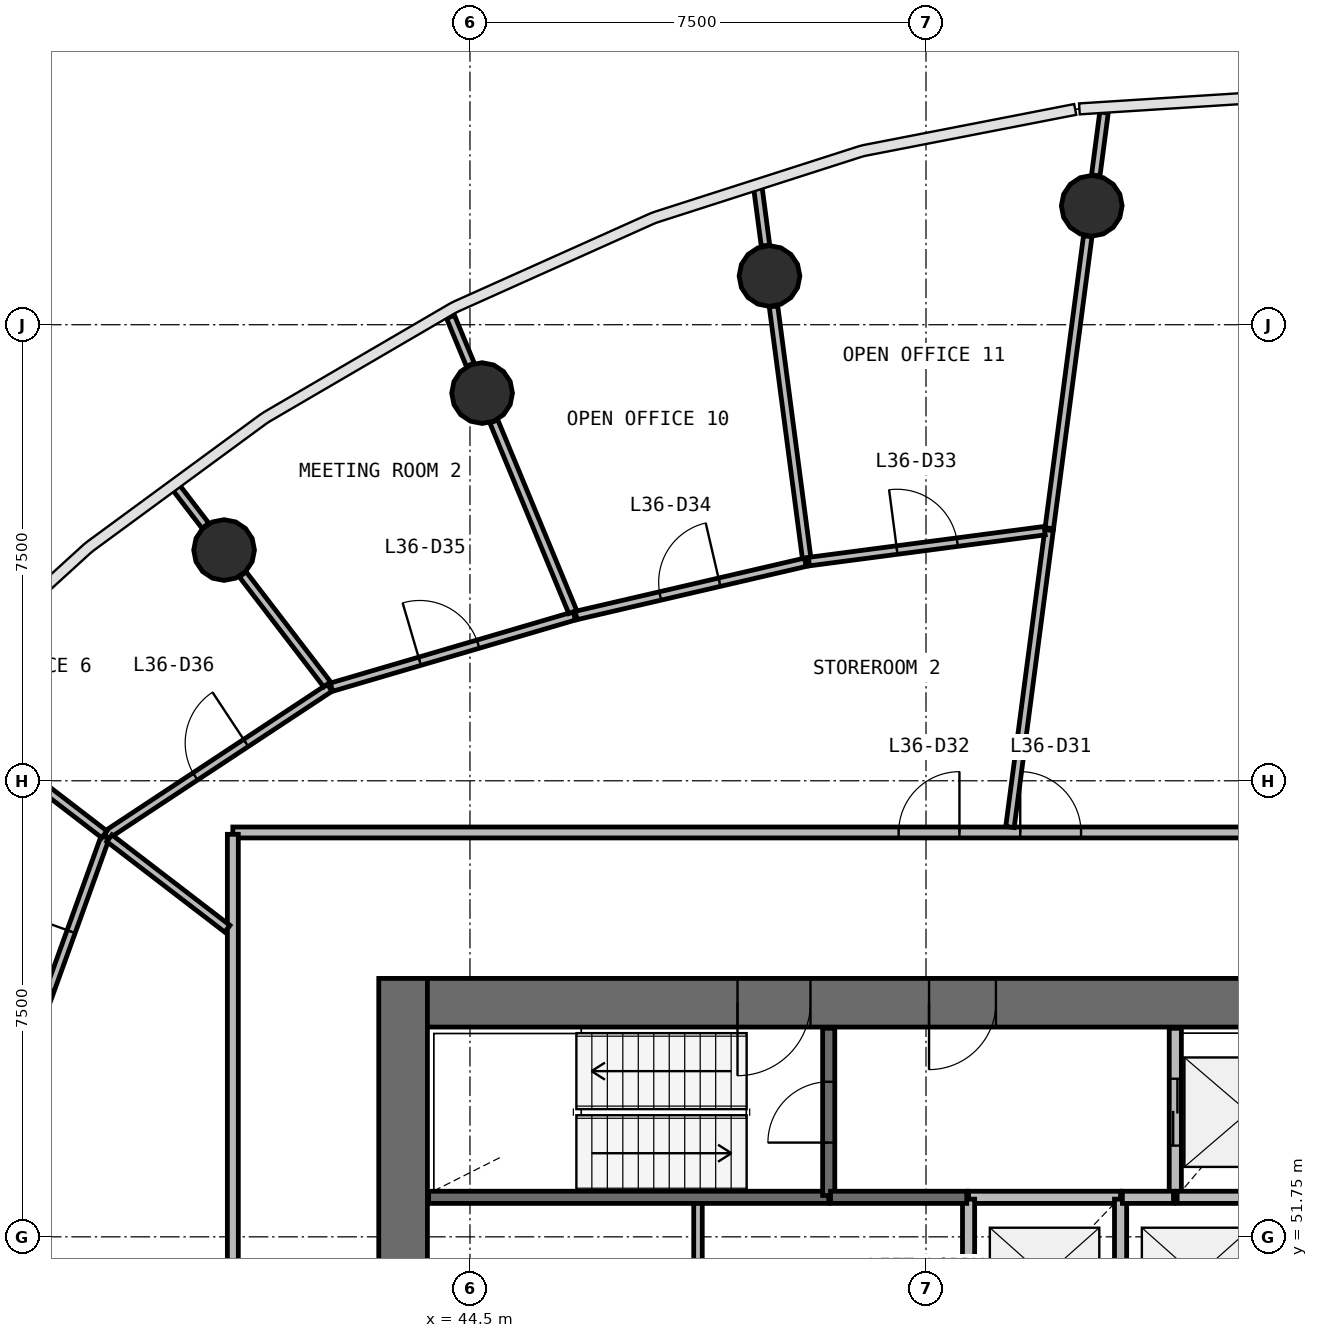
"""IFC4 building model, lengths in metres.
Left out: names, types, materials, properties, quantities, classifications, styles, units other than length and angle.
Written with IfcOpenShell. Run it as: python <this file> out.ifc"""

import sys

from ifc_helpers import new_model, si_unit, direction, frame, frame_2d, origin, origin_2d, place, context, subcontext, project, spatial, rectangle, circle, extrude, source, transform, mapped, element, fill, save


model = new_model("IFC4")
c1 = context("Model", 3, precision=1e-05, world=origin(), true_north=direction((0.0, 1.0)))
c2 = subcontext(c1, "Body", "Model", "MODEL_VIEW")
j1 = project(units=[si_unit("LENGTHUNIT", "METRE"), si_unit("PLANEANGLEUNIT", "RADIAN")], contexts=[c1])
p1 = place(None, origin())
s1 = spatial("IfcSite", under=j1, at=p1, CompositionType="ELEMENT")
p2 = place(p1, origin())
s2 = spatial("IfcBuilding", under=s1, at=p2, CompositionType="ELEMENT")
p3 = place(p2, frame((0.0, 0.0, 152.6)))
s3 = spatial("IfcBuildingStorey", under=s2, at=p3, CompositionType="ELEMENT", Elevation=152.6)
p4 = place(p3, frame((43.4, 56.0, 0.0), z_axis=(0.0, 0.0, 1.0), x_axis=(0.0, -1.0, 0.0)))
e1 = element("IfcWall", 1, at=p4, inside=s3, PredefinedType="SHEAR", context=c2, shape_type="SweptSolid", body=[
    extrude(rectangle(XDim=16.0, YDim=0.8, at=frame_2d((8.0, 0.0))), origin(), (0.0, 0.0, 1.0), 3.9),
])
p5 = place(p4, frame((7.1, 0.0, 0.0)))
e2 = element("IfcOpeningElement", 2, at=p5, cuts=e1, PredefinedType="OPENING", context=c2, shape_type="SweptSolid", body=[
    extrude(rectangle(XDim=1.8, YDim=2.1, at=frame_2d((0.9, 1.05))), frame((0.0, 0.41, 0.0), z_axis=(0.0, -1.0, 0.0), x_axis=(1.0, 0.0, 0.0)), (0.0, 0.0, 1.0), 0.82),
])
p6 = place(p3, frame((60.2, 55.6, 0.0), z_axis=(0.0, 0.0, 1.0), x_axis=(-1.0, 0.0, 0.0)))
e3 = element("IfcWall", 3, at=p6, inside=s3, PredefinedType="SHEAR", context=c2, shape_type="SweptSolid", body=[
    extrude(rectangle(XDim=16.4, YDim=0.8, at=frame_2d((8.2, 0.0))), origin(), (0.0, 0.0, 1.0), 3.9),
])
p7 = place(p6, frame((0.2, 0.0, 0.0)))
e4 = element("IfcOpeningElement", 4, at=p7, cuts=e3, PredefinedType="OPENING", context=c2, shape_type="SweptSolid", body=[
    extrude(rectangle(XDim=1.1, YDim=2.1, at=frame_2d((0.55, 1.05))), frame((0.0, 0.41, 0.0), z_axis=(0.0, -1.0, 0.0), x_axis=(1.0, 0.0, 0.0)), (0.0, 0.0, 1.0), 0.82),
])
p8 = place(p6, frame((10.1, 0.0, 0.0)))
e5 = element("IfcOpeningElement", 5, at=p8, cuts=e3, PredefinedType="OPENING", context=c2, shape_type="SweptSolid", body=[
    extrude(rectangle(XDim=1.2, YDim=2.1, at=frame_2d((0.6, 1.05))), frame((0.0, 0.41, 0.0), z_axis=(0.0, -1.0, 0.0), x_axis=(1.0, 0.0, 0.0)), (0.0, 0.0, 1.0), 0.82),
])
p9 = place(p6, frame((7.05, 0.0, 0.0)))
e6 = element("IfcOpeningElement", 6, at=p9, cuts=e3, PredefinedType="OPENING", context=c2, shape_type="SweptSolid", body=[
    extrude(rectangle(XDim=1.1, YDim=2.1, at=frame_2d((0.55, 1.05))), frame((0.0, 0.41, 0.0), z_axis=(0.0, -1.0, 0.0), x_axis=(1.0, 0.0, 0.0)), (0.0, 0.0, 1.0), 0.82),
])
m1 = source(origin(), c2, "Body", "SweptSolid", [
    extrude(circle(Radius=0.5, at=origin_2d()), origin(), (0.0, 0.0, 1.0), 3.9),
])
for number, where, z_axis, x_axis in (
    (7, (54.726, 68.705, 0.0), (0.0, 0.0, 1.0), (1.0, 0.0, 0.0)),
    (8, (49.426, 67.551, 0.0), (0.0, 0.0, 1.0), (1.0, 0.0, 0.0)),
    (9, (44.699, 65.626, 0.0), (0.0, 0.0, 1.0), (1.0, 0.0, 0.0)),
    (10, (40.456, 63.044, 0.0), (0.0, 0.0, 1.0), (1.0, 0.0, 0.0)),
):
    element("IfcColumn", number, at=place(p3, frame(where, z_axis=z_axis, x_axis=x_axis)), inside=s3, PredefinedType="COLUMN", context=c2, shape_type="MappedRepresentation", body=[
        mapped(m1, transform((0.0, 0.0, 0.0), scale=1.0)),
    ])
p10 = place(p3, frame((43.82, 52.4, 0.0), z_axis=(0.0, 0.0, 1.0), x_axis=(1.0, 0.0, 0.0)))
e11 = element("IfcWall", 11, at=p10, inside=s3, PredefinedType="SOLIDWALL", context=c2, shape_type="SweptSolid", body=[
    extrude(rectangle(XDim=6.58, YDim=0.2, at=frame_2d((3.29, 0.0))), origin(), (0.0, 0.0, 1.0), 3.58),
])
p11 = place(p3, frame((50.4, 52.43, 0.0), z_axis=(0.0, 0.0, 1.0), x_axis=(0.0, 1.0, 0.0)))
e12 = element("IfcWall", 12, at=p11, inside=s3, PredefinedType="SOLIDWALL", context=c2, shape_type="SweptSolid", body=[
    extrude(rectangle(XDim=2.75, YDim=0.2, at=frame_2d((1.375, 0.0))), origin(), (0.0, 0.0, 1.0), 3.58),
])
p12 = place(p11, frame((0.87, 0.0, 0.0)))
e13 = element("IfcOpeningElement", 13, at=p12, cuts=e12, PredefinedType="OPENING", context=c2, shape_type="SweptSolid", body=[
    extrude(rectangle(XDim=1.0, YDim=2.1, at=frame_2d((0.5, 1.05))), frame((0.0, 0.11, 0.0), z_axis=(0.0, -1.0, 0.0), x_axis=(1.0, 0.0, 0.0)), (0.0, 0.0, 1.0), 0.22),
])
p13 = place(p3, frame((56.1, 55.18, 0.0), z_axis=(0.0, 0.0, 1.0), x_axis=(0.0, -1.0, 0.0)))
e14 = element("IfcWall", 14, at=p13, inside=s3, PredefinedType="SOLIDWALL", context=c2, shape_type="SweptSolid", body=[
    extrude(rectangle(XDim=2.78, YDim=0.2, at=frame_2d((1.39, 0.0))), origin(), (0.0, 0.0, 1.0), 3.58),
])
p14 = place(p13, frame((0.83, 0.0, 0.0)))
e15 = element("IfcOpeningElement", 15, at=p14, cuts=e14, PredefinedType="OPENING", context=c2, shape_type="SweptSolid", body=[
    extrude(rectangle(XDim=1.1, YDim=2.1, at=frame_2d((0.55, 1.05))), frame((0.0, 0.11, 0.0), z_axis=(0.0, -1.0, 0.0), x_axis=(1.0, 0.0, 0.0)), (0.0, 0.0, 1.0), 0.22),
])
p15 = place(p3, frame((55.2, 52.4, 0.0), z_axis=(0.0, 0.0, 1.0), x_axis=(-1.0, 0.0, 0.0)))
e16 = element("IfcWall", 16, at=p15, inside=s3, PredefinedType="SOLIDWALL", context=c2, shape_type="SweptSolid", body=[
    extrude(rectangle(XDim=2.5, YDim=0.2, at=frame_2d((1.25, 0.0))), origin(), (0.0, 0.0, 1.0), 3.58),
])
for number, where, z_axis, x_axis in (
    (17, (52.7, 52.37, 0.0), (0.0, 0.0, 1.0), (0.0, -1.0, 0.0)),
    (18, (55.2, 50.01, 0.0), (0.0, 0.0, 1.0), (0.0, 1.0, 0.0)),
):
    element("IfcWall", number, at=place(p3, frame(where, z_axis=z_axis, x_axis=x_axis)), inside=s3, PredefinedType="SOLIDWALL", context=c2, shape_type="SweptSolid", body=[
        extrude(rectangle(XDim=2.36, YDim=0.2, at=frame_2d((1.18, 0.0))), origin(), (0.0, 0.0, 1.0), 3.58),
    ])
p16 = place(p3, frame((50.43, 52.4, 0.0), z_axis=(0.0, 0.0, 1.0), x_axis=(1.0, 0.0, 0.0)))
e19 = element("IfcWall", 19, at=p16, inside=s3, PredefinedType="SOLIDWALL", context=c2, shape_type="SweptSolid", body=[
    extrude(rectangle(XDim=2.24, YDim=0.2, at=frame_2d((1.12, 0.0))), origin(), (0.0, 0.0, 1.0), 3.58),
])
p17 = place(p3, frame((57.67, 52.4, 0.0), z_axis=(0.0, 0.0, 1.0), x_axis=(-1.0, 0.0, 0.0)))
e20 = element("IfcWall", 20, at=p17, inside=s3, PredefinedType="SOLIDWALL", context=c2, shape_type="SweptSolid", body=[
    extrude(rectangle(XDim=1.54, YDim=0.2, at=frame_2d((0.77, 0.0))), origin(), (0.0, 0.0, 1.0), 3.58),
])
p18 = place(p3, frame((56.07, 52.4, 0.0), z_axis=(0.0, 0.0, 1.0), x_axis=(-1.0, 0.0, 0.0)))
e21 = element("IfcWall", 21, at=p18, inside=s3, PredefinedType="SOLIDWALL", context=c2, shape_type="SweptSolid", body=[
    extrude(rectangle(XDim=0.84, YDim=0.2, at=frame_2d((0.42, 0.0))), origin(), (0.0, 0.0, 1.0), 3.58),
])
p19 = place(p3, frame((40.6, 58.4, 0.0), z_axis=(0.0, 0.0, 1.0), x_axis=(1.0, 0.0, 0.0)))
e22 = element("IfcWall", 22, at=p19, inside=s3, PredefinedType="PARTITIONING", context=c2, shape_type="SweptSolid", body=[
    extrude(rectangle(XDim=22.8, YDim=0.18, at=frame_2d((11.4, 0.0))), origin(), (0.0, 0.0, 1.0), 2.88),
])
p20 = place(p19, frame((12.95, 0.0, 0.0)))
e23 = element("IfcOpeningElement", 23, at=p20, cuts=e22, PredefinedType="OPENING", context=c2, shape_type="SweptSolid", body=[
    extrude(rectangle(XDim=1.0, YDim=2.1, at=frame_2d((0.5, 1.05))), frame((0.0, 0.1, 0.0), z_axis=(0.0, -1.0, 0.0), x_axis=(1.0, 0.0, 0.0)), (0.0, 0.0, 1.0), 0.2),
])
p21 = place(p19, frame((10.95, 0.0, 0.0)))
e24 = element("IfcOpeningElement", 24, at=p21, cuts=e22, PredefinedType="OPENING", context=c2, shape_type="SweptSolid", body=[
    extrude(rectangle(XDim=1.0, YDim=2.1, at=frame_2d((0.5, 1.05))), frame((0.0, 0.1, 0.0), z_axis=(0.0, -1.0, 0.0), x_axis=(1.0, 0.0, 0.0)), (0.0, 0.0, 1.0), 0.2),
])
p22 = place(p3, frame((40.6, 37.63, 0.0), z_axis=(0.0, 0.0, 1.0), x_axis=(0.0, 1.0, 0.0)))
e25 = element("IfcWall", 25, at=p22, inside=s3, PredefinedType="PARTITIONING", context=c2, shape_type="SweptSolid", body=[
    extrude(rectangle(XDim=20.74, YDim=0.18, at=frame_2d((10.37, 0.0))), origin(), (0.0, 0.0, 1.0), 2.88),
])
p23 = place(p22, frame((9.89, 0.0, 0.0)))
e26 = element("IfcOpeningElement", 26, at=p23, cuts=e25, PredefinedType="OPENING", context=c2, shape_type="SweptSolid", body=[
    extrude(rectangle(XDim=1.0, YDim=2.1, at=frame_2d((0.5, 1.05))), frame((0.0, 0.1, 0.0), z_axis=(0.0, -1.0, 0.0), x_axis=(1.0, 0.0, 0.0)), (0.0, 0.0, 1.0), 0.2),
])
p24 = place(p22, frame((4.29, 0.0, 0.0)))
e27 = element("IfcOpeningElement", 27, at=p24, cuts=e25, PredefinedType="OPENING", context=c2, shape_type="SweptSolid", body=[
    extrude(rectangle(XDim=1.0, YDim=2.1, at=frame_2d((0.5, 1.05))), frame((0.0, 0.1, 0.0), z_axis=(0.0, -1.0, 0.0), x_axis=(1.0, 0.0, 0.0)), (0.0, 0.0, 1.0), 0.2),
])
p25 = place(p3, frame((53.381, 58.49, 0.0), z_axis=(0.0, 0.0, 1.0), x_axis=(0.130523758186, 0.991445181817, 0.0)))
e28 = element("IfcWall", 28, at=p25, inside=s3, PredefinedType="PARTITIONING", context=c2, shape_type="SweptSolid", body=[
    extrude(rectangle(XDim=4.925, YDim=0.14, at=frame_2d((2.462, 0.0))), origin(), (0.0, 0.0, 1.0), 2.88),
])
p26 = place(p3, frame((54.028, 63.402, 0.0), z_axis=(0.0, 0.0, 1.0), x_axis=(0.130532734851, 0.991443999998, 0.0)))
e29 = element("IfcWall", 29, at=p26, inside=s3, PredefinedType="PARTITIONING", context=c2, shape_type="SweptSolid", body=[
    extrude(rectangle(XDim=4.844, YDim=0.14, at=frame_2d((2.422, 0.0))), origin(), (0.0, 0.0, 1.0), 2.88),
])
p27 = place(p3, frame((38.511, 58.351, 0.0), z_axis=(0.0, 0.0, 1.0), x_axis=(0.834612459485, 0.550837582662, 0.0)))
e30 = element("IfcWall", 30, at=p27, inside=s3, PredefinedType="PARTITIONING", context=c2, shape_type="SweptSolid", body=[
    extrude(rectangle(XDim=4.412, YDim=0.14, at=frame_2d((2.206, 0.0))), origin(), (0.0, 0.0, 1.0), 2.88),
])
p28 = place(p27, frame((1.762, 0.0, 0.0)))
e31 = element("IfcOpeningElement", 31, at=p28, cuts=e30, PredefinedType="OPENING", context=c2, shape_type="SweptSolid", body=[
    extrude(rectangle(XDim=1.0, YDim=2.1, at=frame_2d((0.5, 1.05))), frame((0.0, 0.08, 0.0), z_axis=(0.0, -1.0, 0.0), x_axis=(1.0, 0.0, 0.0)), (0.0, 0.0, 1.0), 0.16),
])
p29 = place(p3, frame((37.016, 54.207, 0.0), z_axis=(0.0, 0.0, 1.0), x_axis=(0.339349662801, 0.940660303381, 0.0)))
e32 = element("IfcWall", 32, at=p29, inside=s3, PredefinedType="PARTITIONING", context=c2, shape_type="SweptSolid", body=[
    extrude(rectangle(XDim=4.376, YDim=0.14, at=frame_2d((2.188, 0.0))), origin(), (0.0, 0.0, 1.0), 2.88),
])
p30 = place(p29, frame((1.725, 0.0, 0.0)))
e33 = element("IfcOpeningElement", 33, at=p30, cuts=e32, PredefinedType="OPENING", context=c2, shape_type="SweptSolid", body=[
    extrude(rectangle(XDim=1.0, YDim=2.1, at=frame_2d((0.5, 1.05))), frame((0.0, 0.08, 0.0), z_axis=(0.0, -1.0, 0.0), x_axis=(1.0, 0.0, 0.0)), (0.0, 0.0, 1.0), 0.16),
])
p31 = place(p3, frame((50.045, 62.85, 0.0), z_axis=(0.0, 0.0, 1.0), x_axis=(-0.130506679213, 0.991447430115, 0.0)))
e34 = element("IfcWall", 34, at=p31, inside=s3, PredefinedType="PARTITIONING", context=c2, shape_type="SweptSolid", body=[
    extrude(rectangle(XDim=4.237, YDim=0.14, at=frame_2d((2.119, 0.0))), origin(), (0.0, 0.0, 1.0), 2.88),
])
p32 = place(p3, frame((42.222, 60.789, 0.0), z_axis=(0.0, 0.0, 1.0), x_axis=(0.959559478974, 0.281505961415, 0.0)))
e35 = element("IfcWall", 35, at=p32, inside=s3, PredefinedType="PARTITIONING", context=c2, shape_type="SweptSolid", body=[
    extrude(rectangle(XDim=4.164, YDim=0.14, at=frame_2d((2.082, 0.0))), origin(), (0.0, 0.0, 1.0), 2.88),
])
p33 = place(p32, frame((1.514, 0.0, 0.0)))
e36 = element("IfcOpeningElement", 36, at=p33, cuts=e35, PredefinedType="OPENING", context=c2, shape_type="SweptSolid", body=[
    extrude(rectangle(XDim=1.0, YDim=2.1, at=frame_2d((0.5, 1.05))), frame((0.0, 0.08, 0.0), z_axis=(0.0, -1.0, 0.0), x_axis=(1.0, 0.0, 0.0)), (0.0, 0.0, 1.0), 0.16),
])
p34 = place(p3, frame((50.075, 62.854, 0.0), z_axis=(0.0, 0.0, 1.0), x_axis=(0.991491442794, 0.130171882012, 0.0)))
e37 = element("IfcWall", 37, at=p34, inside=s3, PredefinedType="PARTITIONING", context=c2, shape_type="SweptSolid", body=[
    extrude(rectangle(XDim=3.91, YDim=0.14, at=frame_2d((1.955, 0.0))), origin(), (0.0, 0.0, 1.0), 2.88),
])
p35 = place(p34, frame((1.461, 0.0, 0.0)))
e38 = element("IfcOpeningElement", 38, at=p35, cuts=e37, PredefinedType="OPENING", context=c2, shape_type="SweptSolid", body=[
    extrude(rectangle(XDim=1.0, YDim=2.1, at=frame_2d((0.5, 1.05))), frame((0.0, 0.08, 0.0), z_axis=(0.0, -1.0, 0.0), x_axis=(1.0, 0.0, 0.0)), (0.0, 0.0, 1.0), 0.16),
])
p36 = place(p3, frame((46.246, 61.968, 0.0), z_axis=(0.0, 0.0, 1.0), x_axis=(0.974087273118, 0.226172465941, 0.0)))
e39 = element("IfcWall", 39, at=p36, inside=s3, PredefinedType="PARTITIONING", context=c2, shape_type="SweptSolid", body=[
    extrude(rectangle(XDim=3.87, YDim=0.14, at=frame_2d((1.935, 0.0))), origin(), (0.0, 0.0, 1.0), 2.88),
])
p37 = place(p36, frame((1.42, 0.0, 0.0)))
e40 = element("IfcOpeningElement", 40, at=p37, cuts=e39, PredefinedType="OPENING", context=c2, shape_type="SweptSolid", body=[
    extrude(rectangle(XDim=1.0, YDim=2.1, at=frame_2d((0.5, 1.05))), frame((0.0, 0.08, 0.0), z_axis=(0.0, -1.0, 0.0), x_axis=(1.0, 0.0, 0.0)), (0.0, 0.0, 1.0), 0.16),
])
p38 = place(p3, frame((46.19, 62.027, 0.0), z_axis=(0.0, 0.0, 1.0), x_axis=(-0.382697308523, 0.923873784696, 0.0)))
e41 = element("IfcWall", 41, at=p38, inside=s3, PredefinedType="PARTITIONING", context=c2, shape_type="SweptSolid", body=[
    extrude(rectangle(XDim=3.391, YDim=0.14, at=frame_2d((1.695, 0.0))), origin(), (0.0, 0.0, 1.0), 2.88),
])
p39 = place(p3, frame((40.51, 56.817, 0.0), z_axis=(0.0, 0.0, 1.0), x_axis=(-0.793387804713, 0.608716511467, 0.0)))
e42 = element("IfcWall", 42, at=p39, inside=s3, PredefinedType="PARTITIONING", context=c2, shape_type="SweptSolid", body=[
    extrude(rectangle(XDim=2.446, YDim=0.14, at=frame_2d((1.223, 0.0))), origin(), (0.0, 0.0, 1.0), 2.88),
])
p40 = place(p3, frame((48.25, 50.01, 0.0), z_axis=(0.0, 0.0, 1.0), x_axis=(0.0, 1.0, 0.0)))
e43 = element("IfcWall", 43, at=p40, inside=s3, PredefinedType="PARTITIONING", context=c2, shape_type="SweptSolid", body=[
    extrude(rectangle(XDim=2.29, YDim=0.14, at=frame_2d((1.145, 0.0))), origin(), (0.0, 0.0, 1.0), 2.88),
])
p41 = place(p3, frame((42.15, 60.836, 0.0), z_axis=(0.0, 0.0, 1.0), x_axis=(-0.608757629388, 0.793356255828, 0.0)))
e44 = element("IfcWall", 44, at=p41, inside=s3, PredefinedType="PARTITIONING", context=c2, shape_type="SweptSolid", body=[
    extrude(rectangle(XDim=2.279, YDim=0.14, at=frame_2d((1.139, 0.0))), origin(), (0.0, 0.0, 1.0), 2.88),
])
p42 = place(p3, frame((38.487, 58.369, 0.0), z_axis=(0.0, 0.0, 1.0), x_axis=(-0.793336842099, 0.608782929269, 0.0)))
e45 = element("IfcWall", 45, at=p42, inside=s3, PredefinedType="PARTITIONING", context=c2, shape_type="SweptSolid", body=[
    extrude(rectangle(XDim=1.794, YDim=0.14, at=frame_2d((0.897, 0.0))), origin(), (0.0, 0.0, 1.0), 2.88),
])
p43 = place(p3, frame((54.792, 69.205, 0.0), z_axis=(0.0, 0.0, 1.0), x_axis=(0.130569518357, 0.991439156417, 0.0)))
e46 = element("IfcWall", 46, at=p43, inside=s3, PredefinedType="PARTITIONING", context=c2, shape_type="SweptSolid", body=[
    extrude(rectangle(XDim=1.043, YDim=0.14, at=frame_2d((0.522, 0.0))), origin(), (0.0, 0.0, 1.0), 2.88),
])
p44 = place(p3, frame((49.36, 68.052, 0.0), z_axis=(0.0, 0.0, 1.0), x_axis=(-0.130434626054, 0.991456911987, 0.0)))
e47 = element("IfcWall", 47, at=p44, inside=s3, PredefinedType="PARTITIONING", context=c2, shape_type="SweptSolid", body=[
    extrude(rectangle(XDim=0.953, YDim=0.14, at=frame_2d((0.476, 0.0))), origin(), (0.0, 0.0, 1.0), 2.88),
])
p45 = place(p3, frame((44.506, 66.092, 0.0), z_axis=(0.0, 0.0, 1.0), x_axis=(-0.382722863119, 0.923863198772, 0.0)))
e48 = element("IfcWall", 48, at=p45, inside=s3, PredefinedType="PARTITIONING", context=c2, shape_type="SweptSolid", body=[
    extrude(rectangle(XDim=0.852, YDim=0.14, at=frame_2d((0.426, 0.0))), origin(), (0.0, 0.0, 1.0), 2.88),
])
p46 = place(p3, frame((40.149, 63.445, 0.0), z_axis=(0.0, 0.0, 1.0), x_axis=(-0.608659697441, 0.793431391307, 0.0)))
e49 = element("IfcWall", 49, at=p46, inside=s3, PredefinedType="PARTITIONING", context=c2, shape_type="SweptSolid", body=[
    extrude(rectangle(XDim=0.786, YDim=0.14, at=frame_2d((0.393, 0.0))), origin(), (0.0, 0.0, 1.0), 2.88),
])
m2 = source(origin(), c2, "Body", "SweptSolid", [
    extrude(rectangle(XDim=1.1, YDim=2.1, at=frame_2d((0.55, 1.05))), frame((0.0, 0.025, 0.0), z_axis=(0.0, -1.0, 0.0), x_axis=(1.0, 0.0, 0.0)), (0.0, 0.0, 1.0), 0.05),
])
p47 = place(p14, origin())
e50 = element("IfcDoor", 50, at=p47, inside=s3, OperationType="DOUBLE_DOOR_SLIDING", PredefinedType="USERDEFINED", context=c2, shape_type="MappedRepresentation", body=[
    mapped(m2, transform((0.0, 0.0, 0.0), scale=1.0)),
])
fill(e15, e50)
m3 = source(origin(), c2, "Body", "SweptSolid", [
    extrude(rectangle(XDim=1.2, YDim=2.1, at=frame_2d((0.6, 1.05))), frame((0.0, 0.025, 0.0), z_axis=(0.0, -1.0, 0.0), x_axis=(1.0, 0.0, 0.0)), (0.0, 0.0, 1.0), 0.05),
])
p48 = place(p8, origin())
e51 = element("IfcDoor", 51, at=p48, inside=s3, OperationType="SINGLE_SWING_RIGHT", PredefinedType="DOOR", context=c2, shape_type="MappedRepresentation", body=[
    mapped(m3, transform((0.0, 0.0, 0.0), scale=1.0)),
])
fill(e5, e51)
m4 = source(origin(), c2, "Body", "SweptSolid", [
    extrude(rectangle(XDim=1.0, YDim=2.1, at=frame_2d((0.5, 1.05))), frame((0.0, 0.025, 0.0), z_axis=(0.0, -1.0, 0.0), x_axis=(1.0, 0.0, 0.0)), (0.0, 0.0, 1.0), 0.05),
])
p49 = place(p12, origin())
e52 = element("IfcDoor", 52, at=p49, inside=s3, OperationType="SINGLE_SWING_LEFT", PredefinedType="DOOR", context=c2, shape_type="MappedRepresentation", body=[
    mapped(m4, transform((0.0, 0.0, 0.0), scale=1.0)),
])
fill(e13, e52)
m5 = source(origin(), c2, "Body", "SweptSolid", [
    extrude(rectangle(XDim=1.1, YDim=2.1, at=frame_2d((0.55, 1.05))), frame((0.0, 0.025, 0.0), z_axis=(0.0, -1.0, 0.0), x_axis=(1.0, 0.0, 0.0)), (0.0, 0.0, 1.0), 0.05),
])
p50 = place(p9, origin())
e53 = element("IfcDoor", 53, at=p50, inside=s3, OperationType="SINGLE_SWING_RIGHT", PredefinedType="DOOR", context=c2, shape_type="MappedRepresentation", body=[
    mapped(m5, transform((0.0, 0.0, 0.0), scale=1.0)),
])
fill(e6, e53)
m6 = source(origin(), c2, "Body", "SweptSolid", [
    extrude(rectangle(XDim=1.0, YDim=2.1, at=frame_2d((0.5, 1.05))), frame((0.0, 0.025, 0.0), z_axis=(0.0, -1.0, 0.0), x_axis=(1.0, 0.0, 0.0)), (0.0, 0.0, 1.0), 0.05),
])
p51 = place(p20, origin())
e54 = element("IfcDoor", 54, at=p51, inside=s3, OperationType="SINGLE_SWING_LEFT", PredefinedType="DOOR", context=c2, shape_type="MappedRepresentation", body=[
    mapped(m6, transform((0.0, 0.0, 0.0), scale=1.0)),
])
fill(e23, e54)
p52 = place(p21, origin())
e55 = element("IfcDoor", 55, at=p52, inside=s3, OperationType="SINGLE_SWING_RIGHT", PredefinedType="DOOR", context=c2, shape_type="MappedRepresentation", body=[
    mapped(m6, transform((0.0, 0.0, 0.0), scale=1.0)),
])
fill(e24, e55)
p53 = place(p35, origin())
e56 = element("IfcDoor", 56, at=p53, inside=s3, OperationType="SINGLE_SWING_LEFT", PredefinedType="DOOR", context=c2, shape_type="MappedRepresentation", body=[
    mapped(m6, transform((0.0, 0.0, 0.0), scale=1.0)),
])
fill(e38, e56)
p54 = place(p37, origin())
e57 = element("IfcDoor", 57, at=p54, inside=s3, OperationType="SINGLE_SWING_RIGHT", PredefinedType="DOOR", context=c2, shape_type="MappedRepresentation", body=[
    mapped(m6, transform((0.0, 0.0, 0.0), scale=1.0)),
])
fill(e40, e57)
p55 = place(p33, origin())
e58 = element("IfcDoor", 58, at=p55, inside=s3, OperationType="SINGLE_SWING_LEFT", PredefinedType="DOOR", context=c2, shape_type="MappedRepresentation", body=[
    mapped(m6, transform((0.0, 0.0, 0.0), scale=1.0)),
])
fill(e36, e58)
p56 = place(p28, origin())
e59 = element("IfcDoor", 59, at=p56, inside=s3, OperationType="SINGLE_SWING_RIGHT", PredefinedType="DOOR", context=c2, shape_type="MappedRepresentation", body=[
    mapped(m6, transform((0.0, 0.0, 0.0), scale=1.0)),
])
fill(e31, e59)
p57 = place(p30, origin())
e60 = element("IfcDoor", 60, at=p57, inside=s3, OperationType="SINGLE_SWING_RIGHT", PredefinedType="DOOR", context=c2, shape_type="MappedRepresentation", body=[
    mapped(m6, transform((0.0, 0.0, 0.0), scale=1.0)),
])
fill(e33, e60)
save(model, sys.argv[1])
